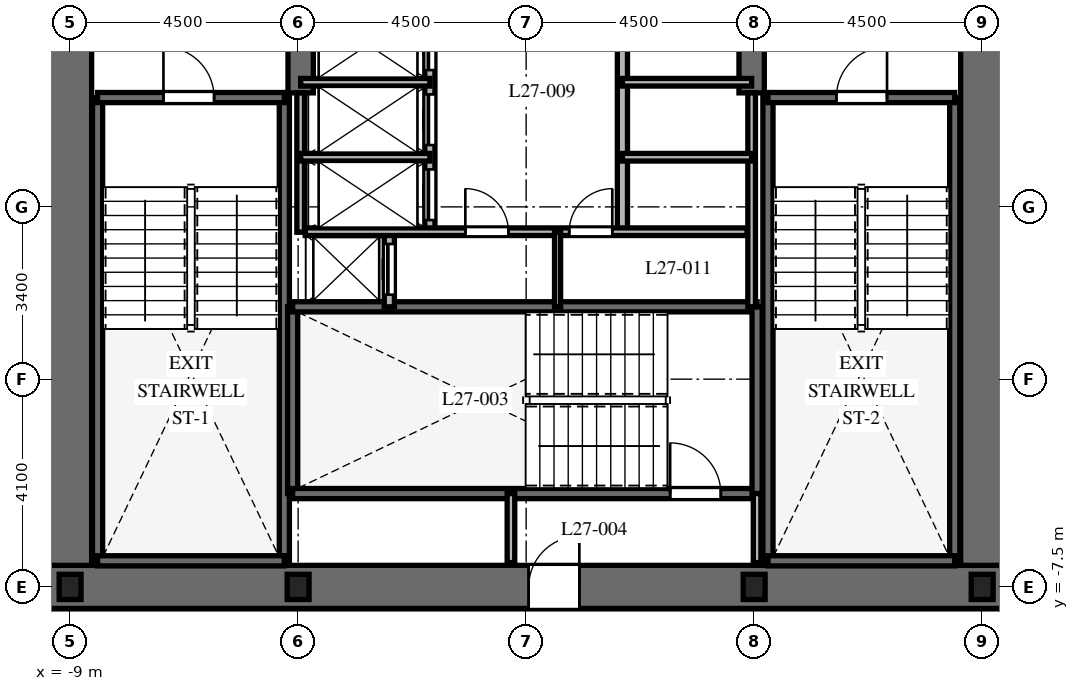
"""IFC4 building model, lengths in metres.
Left out: names, types, materials, properties, quantities, classifications, styles, units other than length and angle.
Written with IfcOpenShell. Run it as: python <this file> out.ifc"""

import sys

from ifc_helpers import new_model, si_unit, direction, frame, frame_2d, origin, origin_2d, place, context, subcontext, project, spatial, rectangle, i_section, extrude, element, fill, save


model = new_model("IFC4")
c1 = context("Model", 3, precision=1e-05, world=origin(), true_north=direction((0.0, 1.0)))
c2 = subcontext(c1, "Body", "Model", "MODEL_VIEW")
j1 = project(units=[si_unit("LENGTHUNIT", "METRE"), si_unit("PLANEANGLEUNIT", "RADIAN")], contexts=[c1])
p1 = place(None, origin())
s1 = spatial("IfcSite", under=j1, at=p1, CompositionType="ELEMENT")
p2 = place(p1, origin())
s2 = spatial("IfcBuilding", under=s1, at=p2, CompositionType="ELEMENT")
p3 = place(p2, frame((0.0, 0.0, 113.6)))
s3 = spatial("IfcBuildingStorey", under=s2, at=p3, CompositionType="ELEMENT", Elevation=113.6)
p4 = place(p3, frame((-9.425, -7.5, 0.0), z_axis=(0.0, 0.0, 1.0), x_axis=(1.0, 0.0, 0.0)))
e1 = element("IfcWall", 1, at=p4, inside=s3, PredefinedType="SHEAR", context=c2, shape_type="SweptSolid", body=[
    extrude(rectangle(XDim=18.85, YDim=0.85, at=frame_2d((9.425, 0.0))), origin(), (0.0, 0.0, 1.0), 3.7),
])
p5 = place(p4, frame((9.475, 0.0, 0.0)))
e2 = element("IfcOpeningElement", 2, at=p5, cuts=e1, PredefinedType="OPENING", context=c2, shape_type="SweptSolid", body=[
    extrude(rectangle(XDim=1.0, YDim=2.15, at=frame_2d((0.5, 1.075))), frame((0.0, 0.435, 0.0), z_axis=(0.0, -1.0, 0.0), x_axis=(1.0, 0.0, 0.0)), (0.0, 0.0, 1.0), 0.87),
])
p6 = place(p3, frame((-9.0, -7.075, 0.0), z_axis=(0.0, 0.0, 1.0), x_axis=(0.0, 1.0, 0.0)))
e3 = element("IfcWall", 3, at=p6, inside=s3, PredefinedType="SHEAR", context=c2, shape_type="SweptSolid", body=[
    extrude(rectangle(XDim=14.15, YDim=0.85, at=frame_2d((7.075, 0.0))), origin(), (0.0, 0.0, 1.0), 3.7),
])
p7 = place(p6, frame((10.2, 0.0, 0.0)))
e4 = element("IfcOpeningElement", 4, at=p7, cuts=e3, PredefinedType="OPENING", context=c2, shape_type="SweptSolid", body=[
    extrude(rectangle(XDim=1.05, YDim=2.15, at=frame_2d((0.525, 1.075))), frame((0.0, 0.435, 0.0), z_axis=(0.0, -1.0, 0.0), x_axis=(1.0, 0.0, 0.0)), (0.0, 0.0, 1.0), 0.87),
])
p8 = place(p3, frame((9.0, -7.075, 0.0), z_axis=(0.0, 0.0, 1.0), x_axis=(0.0, 1.0, 0.0)))
e5 = element("IfcWall", 5, at=p8, inside=s3, PredefinedType="SHEAR", context=c2, shape_type="SweptSolid", body=[
    extrude(rectangle(XDim=14.15, YDim=0.85, at=frame_2d((7.075, 0.0))), origin(), (0.0, 0.0, 1.0), 3.7),
])
p9 = place(p8, frame((10.2, 0.0, 0.0)))
e6 = element("IfcOpeningElement", 6, at=p9, cuts=e5, PredefinedType="OPENING", context=c2, shape_type="SweptSolid", body=[
    extrude(rectangle(XDim=1.05, YDim=2.15, at=frame_2d((0.525, 1.075))), frame((0.0, 0.435, 0.0), z_axis=(0.0, -1.0, 0.0), x_axis=(1.0, 0.0, 0.0)), (0.0, 0.0, 1.0), 0.87),
])
for number, where, z_axis, x_axis in (
    (7, (-4.45, 2.25, 0.0), (0.0, 0.0, 1.0), (0.0, 1.0, 0.0)),
    (8, (4.45, 2.25, 0.0), (0.0, 0.0, 1.0), (0.0, 1.0, 0.0)),
):
    element("IfcWall", number, at=place(p3, frame(where, z_axis=z_axis, x_axis=x_axis)), inside=s3, PredefinedType="SHEAR", context=c2, shape_type="SweptSolid", body=[
        extrude(rectangle(XDim=4.825, YDim=0.5, at=frame_2d((2.413, 0.0))), origin(), (0.0, 0.0, 1.0), 3.7),
    ])
for number, where, z_axis, x_axis in (
    (9, (-8.458, -6.985, 0.0), (0.0, 0.0, 1.0), (0.0, 1.0, 0.0)),
    (10, (-4.772, -6.985, 0.0), (0.0, 0.0, 1.0), (0.0, 1.0, 0.0)),
):
    element("IfcWall", number, at=place(p3, frame(where, z_axis=z_axis, x_axis=x_axis)), inside=s3, PredefinedType="SHEAR", context=c2, shape_type="SweptSolid", body=[
        extrude(rectangle(XDim=9.143, YDim=0.2, at=frame_2d((4.572, 0.0))), origin(), (0.0, 0.0, 1.0), 3.7),
    ])
p10 = place(p3, frame((-8.458, -6.985, 0.0), z_axis=(0.0, 0.0, 1.0), x_axis=(1.0, 0.0, 0.0)))
e11 = element("IfcWall", 11, at=p10, inside=s3, PredefinedType="SHEAR", context=c2, shape_type="SweptSolid", body=[
    extrude(rectangle(XDim=3.686, YDim=0.2, at=frame_2d((1.843, 0.0))), origin(), (0.0, 0.0, 1.0), 3.7),
])
p11 = place(p3, frame((-8.458, 2.158, 0.0), z_axis=(0.0, 0.0, 1.0), x_axis=(1.0, 0.0, 0.0)))
e12 = element("IfcWall", 12, at=p11, inside=s3, PredefinedType="SHEAR", context=c2, shape_type="SweptSolid", body=[
    extrude(rectangle(XDim=3.686, YDim=0.2, at=frame_2d((1.843, 0.0))), origin(), (0.0, 0.0, 1.0), 3.7),
])
p12 = place(p11, frame((1.3, 0.0, 0.0)))
e13 = element("IfcOpeningElement", 13, at=p12, cuts=e12, PredefinedType="OPENING", context=c2, shape_type="SweptSolid", body=[
    extrude(rectangle(XDim=1.0, YDim=2.15, at=frame_2d((0.5, 1.075))), frame((0.0, 0.11, 0.0), z_axis=(0.0, -1.0, 0.0), x_axis=(1.0, 0.0, 0.0)), (0.0, 0.0, 1.0), 0.22),
])
for number, where, z_axis, x_axis in (
    (14, (4.772, -6.985, 0.0), (0.0, 0.0, 1.0), (0.0, 1.0, 0.0)),
    (15, (8.458, -6.985, 0.0), (0.0, 0.0, 1.0), (0.0, 1.0, 0.0)),
):
    element("IfcWall", number, at=place(p3, frame(where, z_axis=z_axis, x_axis=x_axis)), inside=s3, PredefinedType="SHEAR", context=c2, shape_type="SweptSolid", body=[
        extrude(rectangle(XDim=9.143, YDim=0.2, at=frame_2d((4.572, 0.0))), origin(), (0.0, 0.0, 1.0), 3.7),
    ])
p13 = place(p3, frame((4.772, -6.985, 0.0), z_axis=(0.0, 0.0, 1.0), x_axis=(1.0, 0.0, 0.0)))
e16 = element("IfcWall", 16, at=p13, inside=s3, PredefinedType="SHEAR", context=c2, shape_type="SweptSolid", body=[
    extrude(rectangle(XDim=3.686, YDim=0.2, at=frame_2d((1.843, 0.0))), origin(), (0.0, 0.0, 1.0), 3.7),
])
p14 = place(p3, frame((4.772, 2.158, 0.0), z_axis=(0.0, 0.0, 1.0), x_axis=(1.0, 0.0, 0.0)))
e17 = element("IfcWall", 17, at=p14, inside=s3, PredefinedType="SHEAR", context=c2, shape_type="SweptSolid", body=[
    extrude(rectangle(XDim=3.686, YDim=0.2, at=frame_2d((1.843, 0.0))), origin(), (0.0, 0.0, 1.0), 3.7),
])
p15 = place(p14, frame((1.35, 0.0, 0.0)))
e18 = element("IfcOpeningElement", 18, at=p15, cuts=e17, PredefinedType="OPENING", context=c2, shape_type="SweptSolid", body=[
    extrude(rectangle(XDim=1.0, YDim=2.15, at=frame_2d((0.5, 1.075))), frame((0.0, 0.11, 0.0), z_axis=(0.0, -1.0, 0.0), x_axis=(1.0, 0.0, 0.0)), (0.0, 0.0, 1.0), 0.22),
])
p16 = place(p3, frame((-4.608, -5.658, 0.0), z_axis=(0.0, 0.0, 1.0), x_axis=(0.0, 1.0, 0.0)))
e19 = element("IfcWall", 19, at=p16, inside=s3, PredefinedType="SHEAR", context=c2, shape_type="SweptSolid", body=[
    extrude(rectangle(XDim=3.686, YDim=0.2, at=frame_2d((1.843, 0.0))), origin(), (0.0, 0.0, 1.0), 3.7),
])
p17 = place(p3, frame((-4.608, -5.658, 0.0), z_axis=(0.0, 0.0, 1.0), x_axis=(1.0, 0.0, 0.0)))
e20 = element("IfcWall", 20, at=p17, inside=s3, PredefinedType="SHEAR", context=c2, shape_type="SweptSolid", body=[
    extrude(rectangle(XDim=9.166, YDim=0.2, at=frame_2d((4.583, 0.0))), origin(), (0.0, 0.0, 1.0), 3.7),
])
p18 = place(p17, frame((7.45, 0.0, 0.0)))
e21 = element("IfcOpeningElement", 21, at=p18, cuts=e20, PredefinedType="OPENING", context=c2, shape_type="SweptSolid", body=[
    extrude(rectangle(XDim=1.0, YDim=2.15, at=frame_2d((0.5, 1.075))), frame((0.0, 0.11, 0.0), z_axis=(0.0, -1.0, 0.0), x_axis=(1.0, 0.0, 0.0)), (0.0, 0.0, 1.0), 0.22),
])
p19 = place(p3, frame((-4.608, -1.972, 0.0), z_axis=(0.0, 0.0, 1.0), x_axis=(1.0, 0.0, 0.0)))
e22 = element("IfcWall", 22, at=p19, inside=s3, PredefinedType="SHEAR", context=c2, shape_type="SweptSolid", body=[
    extrude(rectangle(XDim=9.166, YDim=0.2, at=frame_2d((4.583, 0.0))), origin(), (0.0, 0.0, 1.0), 3.7),
])
p20 = place(p3, frame((4.558, -5.658, 0.0), z_axis=(0.0, 0.0, 1.0), x_axis=(0.0, 1.0, 0.0)))
e23 = element("IfcWall", 23, at=p20, inside=s3, PredefinedType="SHEAR", context=c2, shape_type="SweptSolid", body=[
    extrude(rectangle(XDim=3.686, YDim=0.2, at=frame_2d((1.843, 0.0))), origin(), (0.0, 0.0, 1.0), 3.7),
])
for number, where, z_axis, x_axis in (
    (24, (-9.0, -7.5, 0.0), (0.0, 0.0, 1.0), (1.0, 0.0, 0.0)),
    (25, (-4.5, -7.5, 0.0), (0.0, 0.0, 1.0), (1.0, 0.0, 0.0)),
    (26, (4.5, -7.5, 0.0), (0.0, 0.0, 1.0), (1.0, 0.0, 0.0)),
    (27, (9.0, -7.5, 0.0), (0.0, 0.0, 1.0), (1.0, 0.0, 0.0)),
):
    element("IfcColumn", number, at=place(p3, frame(where, z_axis=z_axis, x_axis=x_axis)), inside=s3, PredefinedType="COLUMN", context=c2, shape_type="SweptSolid", body=[
        extrude(i_section(OverallWidth=0.432, OverallDepth=0.498, WebThickness=0.056, FlangeThickness=0.089, at=origin_2d()), origin(), (0.0, 0.0, 1.0), 3.7),
    ])
for number, where, z_axis, x_axis in (
    (28, (-0.3, -7.02, 0.0), (0.0, 0.0, 1.0), (0.0, 1.0, 0.0)),
    (29, (4.558, -7.02, 0.0), (0.0, 0.0, 1.0), (0.0, 1.0, 0.0)),
):
    element("IfcWall", number, at=place(p3, frame(where, z_axis=z_axis, x_axis=x_axis)), inside=s3, PredefinedType="PARTITIONING", context=c2, shape_type="SweptSolid", body=[
        extrude(rectangle(XDim=1.362, YDim=0.15, at=frame_2d((0.681, 0.0))), origin(), (0.0, 0.0, 1.0), 3.4),
    ])
p21 = place(p3, frame((-2.7, -1.972, 0.0), z_axis=(0.0, 0.0, 1.0), x_axis=(0.0, 1.0, 0.0)))
e30 = element("IfcWall", 30, at=p21, inside=s3, PredefinedType="PARTITIONING", context=c2, shape_type="SweptSolid", body=[
    extrude(rectangle(XDim=1.472, YDim=0.2, at=frame_2d((0.736, 0.0))), origin(), (0.0, 0.0, 1.0), 3.4),
])
p22 = place(p21, frame((0.24, 0.0, 0.0)))
e31 = element("IfcOpeningElement", 31, at=p22, cuts=e30, PredefinedType="OPENING", context=c2, shape_type="SweptSolid", body=[
    extrude(rectangle(XDim=1.0, YDim=2.2, at=frame_2d((0.5, 1.1))), frame((0.0, 0.11, 0.0), z_axis=(0.0, -1.0, 0.0), x_axis=(1.0, 0.0, 0.0)), (0.0, 0.0, 1.0), 0.22),
])
p23 = place(p3, frame((-4.45, -0.5, 0.0), z_axis=(0.0, 0.0, 1.0), x_axis=(0.0, 1.0, 0.0)))
e32 = element("IfcWall", 32, at=p23, inside=s3, PredefinedType="PARTITIONING", context=c2, shape_type="SweptSolid", body=[
    extrude(rectangle(XDim=2.75, YDim=0.15, at=frame_2d((1.375, 0.0))), origin(), (0.0, 0.0, 1.0), 3.4),
])
p24 = place(p3, frame((4.45, -1.972, 0.0), z_axis=(0.0, 0.0, 1.0), x_axis=(0.0, 1.0, 0.0)))
e33 = element("IfcWall", 33, at=p24, inside=s3, PredefinedType="PARTITIONING", context=c2, shape_type="SweptSolid", body=[
    extrude(rectangle(XDim=4.222, YDim=0.15, at=frame_2d((2.111, 0.0))), origin(), (0.0, 0.0, 1.0), 3.4),
])
p25 = place(p3, frame((-1.9, -0.5, 0.0), z_axis=(0.0, 0.0, 1.0), x_axis=(0.0, 1.0, 0.0)))
e34 = element("IfcWall", 34, at=p25, inside=s3, PredefinedType="PARTITIONING", context=c2, shape_type="SweptSolid", body=[
    extrude(rectangle(XDim=4.44, YDim=0.2, at=frame_2d((2.22, 0.0))), origin(), (0.0, 0.0, 1.0), 3.4),
])
p26 = place(p25, frame((0.24, 0.0, 0.0)))
e35 = element("IfcOpeningElement", 35, at=p26, cuts=e34, PredefinedType="OPENING", context=c2, shape_type="SweptSolid", body=[
    extrude(rectangle(XDim=1.0, YDim=2.2, at=frame_2d((0.5, 1.1))), frame((0.0, 0.11, 0.0), z_axis=(0.0, -1.0, 0.0), x_axis=(1.0, 0.0, 0.0)), (0.0, 0.0, 1.0), 0.22),
])
p27 = place(p25, frame((1.72, 0.0, 0.0)))
e36 = element("IfcOpeningElement", 36, at=p27, cuts=e34, PredefinedType="OPENING", context=c2, shape_type="SweptSolid", body=[
    extrude(rectangle(XDim=1.0, YDim=2.2, at=frame_2d((0.5, 1.1))), frame((0.0, 0.11, 0.0), z_axis=(0.0, -1.0, 0.0), x_axis=(1.0, 0.0, 0.0)), (0.0, 0.0, 1.0), 0.22),
])
p28 = place(p25, frame((3.2, 0.0, 0.0)))
e37 = element("IfcOpeningElement", 37, at=p28, cuts=e34, PredefinedType="OPENING", context=c2, shape_type="SweptSolid", body=[
    extrude(rectangle(XDim=1.0, YDim=2.2, at=frame_2d((0.5, 1.1))), frame((0.0, 0.11, 0.0), z_axis=(0.0, -1.0, 0.0), x_axis=(1.0, 0.0, 0.0)), (0.0, 0.0, 1.0), 0.22),
])
for number, where, z_axis, x_axis in (
    (38, (-4.45, 0.98, 0.0), (0.0, 0.0, 1.0), (1.0, 0.0, 0.0)),
    (39, (-4.45, 2.46, 0.0), (0.0, 0.0, 1.0), (1.0, 0.0, 0.0)),
):
    element("IfcWall", number, at=place(p3, frame(where, z_axis=z_axis, x_axis=x_axis)), inside=s3, PredefinedType="PARTITIONING", context=c2, shape_type="SweptSolid", body=[
        extrude(rectangle(XDim=2.55, YDim=0.15, at=frame_2d((1.275, 0.0))), origin(), (0.0, 0.0, 1.0), 3.4),
    ])
p29 = place(p3, frame((1.9, -0.5, 0.0), z_axis=(0.0, 0.0, 1.0), x_axis=(0.0, 1.0, 0.0)))
e40 = element("IfcWall", 40, at=p29, inside=s3, PredefinedType="PARTITIONING", context=c2, shape_type="SweptSolid", body=[
    extrude(rectangle(XDim=4.44, YDim=0.2, at=frame_2d((2.22, 0.0))), origin(), (0.0, 0.0, 1.0), 3.4),
])
for number, where, z_axis, x_axis in (
    (41, (1.9, 0.98, 0.0), (0.0, 0.0, 1.0), (1.0, 0.0, 0.0)),
    (42, (1.9, 2.46, 0.0), (0.0, 0.0, 1.0), (1.0, 0.0, 0.0)),
):
    element("IfcWall", number, at=place(p3, frame(where, z_axis=z_axis, x_axis=x_axis)), inside=s3, PredefinedType="PARTITIONING", context=c2, shape_type="SweptSolid", body=[
        extrude(rectangle(XDim=2.55, YDim=0.15, at=frame_2d((1.275, 0.0))), origin(), (0.0, 0.0, 1.0), 3.4),
    ])
p30 = place(p3, frame((-4.36, -0.49, 0.0), z_axis=(0.0, 0.0, 1.0), x_axis=(1.0, 0.0, 0.0)))
e43 = element("IfcWall", 43, at=p30, inside=s3, PredefinedType="PARTITIONING", context=c2, shape_type="SweptSolid", body=[
    extrude(rectangle(XDim=8.72, YDim=0.15, at=frame_2d((4.36, 0.0))), origin(), (0.0, 0.0, 1.0), 3.4),
])
p31 = place(p30, frame((3.16, 0.0, 0.0)))
e44 = element("IfcOpeningElement", 44, at=p31, cuts=e43, PredefinedType="OPENING", context=c2, shape_type="SweptSolid", body=[
    extrude(rectangle(XDim=0.85, YDim=2.03, at=frame_2d((0.425, 1.015))), frame((0.0, 0.085, 0.0), z_axis=(0.0, -1.0, 0.0), x_axis=(1.0, 0.0, 0.0)), (0.0, 0.0, 1.0), 0.17),
])
p32 = place(p30, frame((5.21, 0.0, 0.0)))
e45 = element("IfcOpeningElement", 45, at=p32, cuts=e43, PredefinedType="OPENING", context=c2, shape_type="SweptSolid", body=[
    extrude(rectangle(XDim=0.85, YDim=2.03, at=frame_2d((0.425, 1.015))), frame((0.0, 0.085, 0.0), z_axis=(0.0, -1.0, 0.0), x_axis=(1.0, 0.0, 0.0)), (0.0, 0.0, 1.0), 0.17),
])
p33 = place(p3, frame((0.62, -1.972, 0.0), z_axis=(0.0, 0.0, 1.0), x_axis=(0.0, 1.0, 0.0)))
e46 = element("IfcWall", 46, at=p33, inside=s3, PredefinedType="PARTITIONING", context=c2, shape_type="SweptSolid", body=[
    extrude(rectangle(XDim=1.472, YDim=0.12, at=frame_2d((0.736, 0.0))), origin(), (0.0, 0.0, 1.0), 3.4),
])
p34 = place(p12, origin())
e47 = element("IfcDoor", 47, at=p34, inside=s3, OperationType="SINGLE_SWING_LEFT", PredefinedType="DOOR", context=c2, shape_type="SweptSolid", body=[
    extrude(rectangle(XDim=1.0, YDim=2.15, at=frame_2d((0.5, 1.075))), frame((0.0, 0.025, 0.0), z_axis=(0.0, -1.0, 0.0), x_axis=(1.0, 0.0, 0.0)), (0.0, 0.0, 1.0), 0.05),
])
fill(e13, e47)
p35 = place(p15, origin())
e48 = element("IfcDoor", 48, at=p35, inside=s3, OperationType="SINGLE_SWING_RIGHT", PredefinedType="DOOR", context=c2, shape_type="SweptSolid", body=[
    extrude(rectangle(XDim=1.0, YDim=2.15, at=frame_2d((0.5, 1.075))), frame((0.0, 0.025, 0.0), z_axis=(0.0, -1.0, 0.0), x_axis=(1.0, 0.0, 0.0)), (0.0, 0.0, 1.0), 0.05),
])
fill(e18, e48)
p36 = place(p18, origin())
e49 = element("IfcDoor", 49, at=p36, inside=s3, OperationType="SINGLE_SWING_LEFT", PredefinedType="DOOR", context=c2, shape_type="SweptSolid", body=[
    extrude(rectangle(XDim=1.0, YDim=2.15, at=frame_2d((0.5, 1.075))), frame((0.0, 0.025, 0.0), z_axis=(0.0, -1.0, 0.0), x_axis=(1.0, 0.0, 0.0)), (0.0, 0.0, 1.0), 0.05),
])
fill(e21, e49)
p37 = place(p5, origin())
e50 = element("IfcDoor", 50, at=p37, inside=s3, OperationType="SINGLE_SWING_RIGHT", PredefinedType="DOOR", context=c2, shape_type="SweptSolid", body=[
    extrude(rectangle(XDim=1.0, YDim=2.15, at=frame_2d((0.5, 1.075))), frame((0.0, 0.025, 0.0), z_axis=(0.0, -1.0, 0.0), x_axis=(1.0, 0.0, 0.0)), (0.0, 0.0, 1.0), 0.05),
])
fill(e2, e50)
p38 = place(p22, origin())
e51 = element("IfcDoor", 51, at=p38, inside=s3, OperationType="SLIDING_TO_LEFT", PredefinedType="DOOR", context=c2, shape_type="SweptSolid", body=[
    extrude(rectangle(XDim=1.0, YDim=2.2, at=frame_2d((0.5, 1.1))), frame((0.0, 0.025, 0.0), z_axis=(0.0, -1.0, 0.0), x_axis=(1.0, 0.0, 0.0)), (0.0, 0.0, 1.0), 0.05),
])
fill(e31, e51)
p39 = place(p26, origin())
e52 = element("IfcDoor", 52, at=p39, inside=s3, OperationType="SLIDING_TO_LEFT", PredefinedType="DOOR", context=c2, shape_type="SweptSolid", body=[
    extrude(rectangle(XDim=1.0, YDim=2.2, at=frame_2d((0.5, 1.1))), frame((0.0, 0.025, 0.0), z_axis=(0.0, -1.0, 0.0), x_axis=(1.0, 0.0, 0.0)), (0.0, 0.0, 1.0), 0.05),
])
fill(e35, e52)
p40 = place(p27, origin())
e53 = element("IfcDoor", 53, at=p40, inside=s3, OperationType="SLIDING_TO_LEFT", PredefinedType="DOOR", context=c2, shape_type="SweptSolid", body=[
    extrude(rectangle(XDim=1.0, YDim=2.2, at=frame_2d((0.5, 1.1))), frame((0.0, 0.025, 0.0), z_axis=(0.0, -1.0, 0.0), x_axis=(1.0, 0.0, 0.0)), (0.0, 0.0, 1.0), 0.05),
])
fill(e36, e53)
p41 = place(p28, origin())
e54 = element("IfcDoor", 54, at=p41, inside=s3, OperationType="SLIDING_TO_LEFT", PredefinedType="DOOR", context=c2, shape_type="SweptSolid", body=[
    extrude(rectangle(XDim=1.0, YDim=2.2, at=frame_2d((0.5, 1.1))), frame((0.0, 0.025, 0.0), z_axis=(0.0, -1.0, 0.0), x_axis=(1.0, 0.0, 0.0)), (0.0, 0.0, 1.0), 0.05),
])
fill(e37, e54)
p42 = place(p31, origin())
e55 = element("IfcDoor", 55, at=p42, inside=s3, OperationType="SINGLE_SWING_LEFT", PredefinedType="DOOR", context=c2, shape_type="SweptSolid", body=[
    extrude(rectangle(XDim=0.85, YDim=2.03, at=frame_2d((0.425, 1.015))), frame((0.0, 0.025, 0.0), z_axis=(0.0, -1.0, 0.0), x_axis=(1.0, 0.0, 0.0)), (0.0, 0.0, 1.0), 0.05),
])
fill(e44, e55)
p43 = place(p32, origin())
e56 = element("IfcDoor", 56, at=p43, inside=s3, OperationType="SINGLE_SWING_RIGHT", PredefinedType="DOOR", context=c2, shape_type="SweptSolid", body=[
    extrude(rectangle(XDim=0.85, YDim=2.03, at=frame_2d((0.425, 1.015))), frame((0.0, 0.025, 0.0), z_axis=(0.0, -1.0, 0.0), x_axis=(1.0, 0.0, 0.0)), (0.0, 0.0, 1.0), 0.05),
])
fill(e45, e56)
save(model, sys.argv[1])
